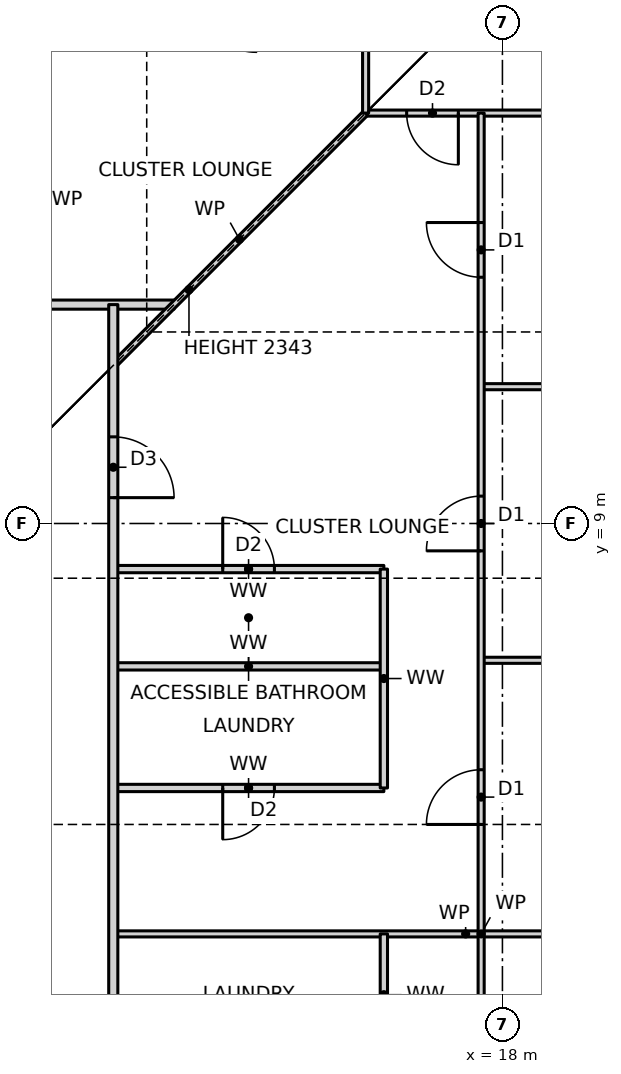
"""IFC4 building model, lengths in metres.
Left out: names, types, materials, properties, quantities, classifications, styles, units other than length and angle.
Written with IfcOpenShell. Run it as: python <this file> out.ifc"""

import sys

from ifc_helpers import new_model, si_unit, direction, frame, frame_2d, origin, place, context, subcontext, project, spatial, rectangle, extrude, element, fill, save


model = new_model("IFC4")
c1 = context("Model", 3, precision=1e-05, world=origin(), true_north=direction((0.0, 1.0)))
c2 = subcontext(c1, "Body", "Model", "MODEL_VIEW")
j1 = project(units=[si_unit("LENGTHUNIT", "METRE"), si_unit("PLANEANGLEUNIT", "RADIAN")], contexts=[c1])
p1 = place(None, origin())
s1 = spatial("IfcSite", under=j1, at=p1, CompositionType="ELEMENT")
p2 = place(p1, origin())
s2 = spatial("IfcBuilding", under=s1, at=p2, CompositionType="ELEMENT")
p3 = place(p2, frame((0.0, 0.0, 43.0)))
s3 = spatial("IfcBuildingStorey", under=s2, at=p3, CompositionType="ELEMENT", Elevation=43.0)
p4 = place(p3, frame((11.6, 2.25, 0.0), z_axis=(0.0, 0.0, 1.0), x_axis=(1.0, 0.0, 0.0)))
e1 = element("IfcWall", 1, at=p4, inside=s3, PredefinedType="PARTITIONING", context=c2, shape_type="SweptSolid", body=[
    extrude(rectangle(XDim=11.59, YDim=0.1, at=frame_2d((5.795, 0.0))), origin(), (0.0, 0.0, 1.0), 3.27),
])
p5 = place(p3, frame((11.6, 4.65, 0.0), z_axis=(0.0, 0.0, 1.0), x_axis=(1.0, 0.0, 0.0)))
e2 = element("IfcWall", 2, at=p5, inside=s3, PredefinedType="PARTITIONING", context=c2, shape_type="SweptSolid", body=[
    extrude(rectangle(XDim=4.45, YDim=0.12, at=frame_2d((2.225, 0.0))), origin(), (0.0, 0.0, 1.0), 3.27),
])
p6 = place(p5, frame((1.8, 0.0, 0.0)))
e3 = element("IfcOpeningElement", 3, at=p6, cuts=e2, PredefinedType="OPENING", context=c2, shape_type="SweptSolid", body=[
    extrude(rectangle(XDim=0.85, YDim=2.1, at=frame_2d((0.425, 1.05))), frame((0.0, 0.07, 0.0), z_axis=(0.0, -1.0, 0.0), x_axis=(1.0, 0.0, 0.0)), (0.0, 0.0, 1.0), 0.14),
])
p7 = place(p3, frame((11.6, 6.65, 0.0), z_axis=(0.0, 0.0, 1.0), x_axis=(1.0, 0.0, 0.0)))
e4 = element("IfcWall", 4, at=p7, inside=s3, PredefinedType="PARTITIONING", context=c2, shape_type="SweptSolid", body=[
    extrude(rectangle(XDim=4.45, YDim=0.12, at=frame_2d((2.225, 0.0))), origin(), (0.0, 0.0, 1.0), 3.27),
])
p8 = place(p3, frame((17.65, 6.75, 0.0), z_axis=(0.0, 0.0, 1.0), x_axis=(1.0, 0.0, 0.0)))
e5 = element("IfcWall", 5, at=p8, inside=s3, PredefinedType="PARTITIONING", context=c2, shape_type="SweptSolid", body=[
    extrude(rectangle(XDim=5.54, YDim=0.1, at=frame_2d((2.77, 0.0))), origin(), (0.0, 0.0, 1.0), 3.27),
])
p9 = place(p3, frame((11.6, 8.25, 0.0), z_axis=(0.0, 0.0, 1.0), x_axis=(1.0, 0.0, 0.0)))
e6 = element("IfcWall", 6, at=p9, inside=s3, PredefinedType="PARTITIONING", context=c2, shape_type="SweptSolid", body=[
    extrude(rectangle(XDim=4.45, YDim=0.12, at=frame_2d((2.225, 0.0))), origin(), (0.0, 0.0, 1.0), 3.27),
])
p10 = place(p9, frame((1.8, 0.0, 0.0)))
e7 = element("IfcOpeningElement", 7, at=p10, cuts=e6, PredefinedType="OPENING", context=c2, shape_type="SweptSolid", body=[
    extrude(rectangle(XDim=0.85, YDim=2.1, at=frame_2d((0.425, 1.05))), frame((0.0, 0.07, 0.0), z_axis=(0.0, -1.0, 0.0), x_axis=(1.0, 0.0, 0.0)), (0.0, 0.0, 1.0), 0.14),
])
p11 = place(p3, frame((17.65, 11.25, 0.0), z_axis=(0.0, 0.0, 1.0), x_axis=(1.0, 0.0, 0.0)))
e8 = element("IfcWall", 8, at=p11, inside=s3, PredefinedType="PARTITIONING", context=c2, shape_type="SweptSolid", body=[
    extrude(rectangle(XDim=5.54, YDim=0.1, at=frame_2d((2.77, 0.0))), origin(), (0.0, 0.0, 1.0), 3.27),
])
p12 = place(p3, frame((-12.6, 12.6, 0.0), z_axis=(0.0, 0.0, 1.0), x_axis=(1.0, 0.0, 0.0)))
e9 = element("IfcWall", 9, at=p12, inside=s3, PredefinedType="PARTITIONING", context=c2, shape_type="SweptSolid", body=[
    extrude(rectangle(XDim=25.2, YDim=0.15, at=frame_2d((12.6, 0.0))), origin(), (0.0, 0.0, 1.0), 3.27),
])
p13 = place(p12, frame((3.15, 0.0, 0.0)))
e10 = element("IfcOpeningElement", 10, at=p13, cuts=e9, PredefinedType="OPENING", context=c2, shape_type="SweptSolid", body=[
    extrude(rectangle(XDim=1.0, YDim=2.1, at=frame_2d((0.5, 1.05))), frame((0.0, 0.085, 0.0), z_axis=(0.0, -1.0, 0.0), x_axis=(1.0, 0.0, 0.0)), (0.0, 0.0, 1.0), 0.17),
])
p14 = place(p3, frame((15.75, 15.75, 0.0), z_axis=(0.0, 0.0, 1.0), x_axis=(1.0, 0.0, 0.0)))
e11 = element("IfcWall", 11, at=p14, inside=s3, PredefinedType="PARTITIONING", context=c2, shape_type="SweptSolid", body=[
    extrude(rectangle(XDim=7.44, YDim=0.1, at=frame_2d((3.72, 0.0))), origin(), (0.0, 0.0, 1.0), 3.27),
])
p15 = place(p14, frame((0.675, 0.0, 0.0)))
e12 = element("IfcOpeningElement", 12, at=p15, cuts=e11, PredefinedType="OPENING", context=c2, shape_type="SweptSolid", body=[
    extrude(rectangle(XDim=0.85, YDim=2.1, at=frame_2d((0.425, 1.05))), frame((0.0, 0.06, 0.0), z_axis=(0.0, -1.0, 0.0), x_axis=(1.0, 0.0, 0.0)), (0.0, 0.0, 1.0), 0.12),
])
p16 = place(p3, frame((11.6, 11.6, 0.0), z_axis=(0.0, 0.0, 1.0), x_axis=(0.707106781187, 0.707106781187, 0.0)))
e13 = element("IfcWall", 13, at=p16, inside=s3, PredefinedType="PARTITIONING", context=c2, shape_type="SweptSolid", body=[
    extrude(rectangle(XDim=5.869, YDim=0.1, at=frame_2d((2.935, 0.0))), origin(), (0.0, 0.0, 1.0), 2.343),
])
p17 = place(p3, frame((17.65, -11.25, 0.0), z_axis=(0.0, 0.0, 1.0), x_axis=(0.0, 1.0, 0.0)))
e14 = element("IfcWall", 14, at=p17, inside=s3, PredefinedType="PARTITIONING", context=c2, shape_type="SweptSolid", body=[
    extrude(rectangle(XDim=27.0, YDim=0.1, at=frame_2d((13.5, 0.0))), origin(), (0.0, 0.0, 1.0), 3.0),
])
p18 = place(p17, frame((1.8, 0.0, 0.0)))
e15 = element("IfcOpeningElement", 15, at=p18, cuts=e14, PredefinedType="OPENING", context=c2, shape_type="SweptSolid", body=[
    extrude(rectangle(XDim=0.9, YDim=2.1, at=frame_2d((0.45, 1.05))), frame((0.0, 0.06, 0.0), z_axis=(0.0, -1.0, 0.0), x_axis=(1.0, 0.0, 0.0)), (0.0, 0.0, 1.0), 0.12),
])
p19 = place(p17, frame((6.3, 0.0, 0.0)))
e16 = element("IfcOpeningElement", 16, at=p19, cuts=e14, PredefinedType="OPENING", context=c2, shape_type="SweptSolid", body=[
    extrude(rectangle(XDim=0.9, YDim=2.1, at=frame_2d((0.45, 1.05))), frame((0.0, 0.06, 0.0), z_axis=(0.0, -1.0, 0.0), x_axis=(1.0, 0.0, 0.0)), (0.0, 0.0, 1.0), 0.12),
])
p20 = place(p17, frame((10.8, 0.0, 0.0)))
e17 = element("IfcOpeningElement", 17, at=p20, cuts=e14, PredefinedType="OPENING", context=c2, shape_type="SweptSolid", body=[
    extrude(rectangle(XDim=0.9, YDim=2.1, at=frame_2d((0.45, 1.05))), frame((0.0, 0.06, 0.0), z_axis=(0.0, -1.0, 0.0), x_axis=(1.0, 0.0, 0.0)), (0.0, 0.0, 1.0), 0.12),
])
p21 = place(p17, frame((15.3, 0.0, 0.0)))
e18 = element("IfcOpeningElement", 18, at=p21, cuts=e14, PredefinedType="OPENING", context=c2, shape_type="SweptSolid", body=[
    extrude(rectangle(XDim=0.9, YDim=2.1, at=frame_2d((0.45, 1.05))), frame((0.0, 0.06, 0.0), z_axis=(0.0, -1.0, 0.0), x_axis=(1.0, 0.0, 0.0)), (0.0, 0.0, 1.0), 0.12),
])
p22 = place(p17, frame((19.8, 0.0, 0.0)))
e19 = element("IfcOpeningElement", 19, at=p22, cuts=e14, PredefinedType="OPENING", context=c2, shape_type="SweptSolid", body=[
    extrude(rectangle(XDim=0.9, YDim=2.1, at=frame_2d((0.45, 1.05))), frame((0.0, 0.06, 0.0), z_axis=(0.0, -1.0, 0.0), x_axis=(1.0, 0.0, 0.0)), (0.0, 0.0, 1.0), 0.12),
])
p23 = place(p17, frame((24.3, 0.0, 0.0)))
e20 = element("IfcOpeningElement", 20, at=p23, cuts=e14, PredefinedType="OPENING", context=c2, shape_type="SweptSolid", body=[
    extrude(rectangle(XDim=0.9, YDim=2.1, at=frame_2d((0.45, 1.05))), frame((0.0, 0.06, 0.0), z_axis=(0.0, -1.0, 0.0), x_axis=(1.0, 0.0, 0.0)), (0.0, 0.0, 1.0), 0.12),
])
p24 = place(p3, frame((16.05, 0.25, 0.0), z_axis=(0.0, 0.0, 1.0), x_axis=(0.0, 1.0, 0.0)))
e21 = element("IfcWall", 21, at=p24, inside=s3, PredefinedType="PARTITIONING", context=c2, shape_type="SweptSolid", body=[
    extrude(rectangle(XDim=2.0, YDim=0.12, at=frame_2d((1.0, 0.0))), origin(), (0.0, 0.0, 1.0), 3.27),
])
p25 = place(p3, frame((16.05, 4.65, 0.0), z_axis=(0.0, 0.0, 1.0), x_axis=(0.0, 1.0, 0.0)))
e22 = element("IfcWall", 22, at=p25, inside=s3, PredefinedType="PARTITIONING", context=c2, shape_type="SweptSolid", body=[
    extrude(rectangle(XDim=3.6, YDim=0.12, at=frame_2d((1.8, 0.0))), origin(), (0.0, 0.0, 1.0), 3.27),
])
p26 = place(p3, frame((15.75, 15.75, 0.0), z_axis=(0.0, 0.0, 1.0), x_axis=(0.0, 1.0, 0.0)))
e23 = element("IfcWall", 23, at=p26, inside=s3, PredefinedType="PARTITIONING", context=c2, shape_type="SweptSolid", body=[
    extrude(rectangle(XDim=7.44, YDim=0.1, at=frame_2d((3.72, 0.0))), origin(), (0.0, 0.0, 1.0), 3.27),
])
p27 = place(p3, frame((11.6, -11.6, 0.0), z_axis=(0.0, 0.0, 1.0), x_axis=(0.0, 1.0, 0.0)))
e24 = element("IfcWall", 24, at=p27, inside=s3, PredefinedType="PARTITIONING", context=c2, shape_type="SweptSolid", body=[
    extrude(rectangle(XDim=24.2, YDim=0.15, at=frame_2d((12.1, 0.0))), origin(), (0.0, 0.0, 1.0), 3.27),
])
p28 = place(p27, frame((3.6, 0.0, 0.0)))
e25 = element("IfcOpeningElement", 25, at=p28, cuts=e24, PredefinedType="OPENING", context=c2, shape_type="SweptSolid", body=[
    extrude(rectangle(XDim=1.0, YDim=2.1, at=frame_2d((0.5, 1.05))), frame((0.0, 0.085, 0.0), z_axis=(0.0, -1.0, 0.0), x_axis=(1.0, 0.0, 0.0)), (0.0, 0.0, 1.0), 0.17),
])
p29 = place(p27, frame((21.025, 0.0, 0.0)))
e26 = element("IfcOpeningElement", 26, at=p29, cuts=e24, PredefinedType="OPENING", context=c2, shape_type="SweptSolid", body=[
    extrude(rectangle(XDim=1.0, YDim=2.1, at=frame_2d((0.5, 1.05))), frame((0.0, 0.085, 0.0), z_axis=(0.0, -1.0, 0.0), x_axis=(1.0, 0.0, 0.0)), (0.0, 0.0, 1.0), 0.17),
])
p30 = place(p21, origin())
e27 = element("IfcDoor", 27, at=p30, inside=s3, OperationType="SINGLE_SWING_LEFT", PredefinedType="DOOR", context=c2, shape_type="SweptSolid", body=[
    extrude(rectangle(XDim=0.9, YDim=2.1, at=frame_2d((0.45, 1.05))), frame((0.0, 0.025, 0.0), z_axis=(0.0, -1.0, 0.0), x_axis=(1.0, 0.0, 0.0)), (0.0, 0.0, 1.0), 0.05),
])
fill(e18, e27)
p31 = place(p22, origin())
e28 = element("IfcDoor", 28, at=p31, inside=s3, OperationType="SINGLE_SWING_LEFT", PredefinedType="DOOR", context=c2, shape_type="SweptSolid", body=[
    extrude(rectangle(XDim=0.9, YDim=2.1, at=frame_2d((0.45, 1.05))), frame((0.0, 0.025, 0.0), z_axis=(0.0, -1.0, 0.0), x_axis=(1.0, 0.0, 0.0)), (0.0, 0.0, 1.0), 0.05),
])
fill(e19, e28)
p32 = place(p23, origin())
e29 = element("IfcDoor", 29, at=p32, inside=s3, OperationType="SINGLE_SWING_RIGHT", PredefinedType="DOOR", context=c2, shape_type="SweptSolid", body=[
    extrude(rectangle(XDim=0.9, YDim=2.1, at=frame_2d((0.45, 1.05))), frame((0.0, 0.025, 0.0), z_axis=(0.0, -1.0, 0.0), x_axis=(1.0, 0.0, 0.0)), (0.0, 0.0, 1.0), 0.05),
])
fill(e20, e29)
p33 = place(p29, frame((1.0, 0.0, 0.0), z_axis=(0.0, 0.0, 1.0), x_axis=(-1.0, 0.0, 0.0)))
e30 = element("IfcDoor", 30, at=p33, inside=s3, OperationType="SINGLE_SWING_RIGHT", PredefinedType="DOOR", context=c2, shape_type="SweptSolid", body=[
    extrude(rectangle(XDim=1.0, YDim=2.1, at=frame_2d((0.5, 1.05))), frame((0.0, 0.025, 0.0), z_axis=(0.0, -1.0, 0.0), x_axis=(1.0, 0.0, 0.0)), (0.0, 0.0, 1.0), 0.05),
])
fill(e26, e30)
p34 = place(p6, frame((0.85, 0.0, 0.0), z_axis=(0.0, 0.0, 1.0), x_axis=(-1.0, 0.0, 0.0)))
e31 = element("IfcDoor", 31, at=p34, inside=s3, OperationType="SINGLE_SWING_RIGHT", PredefinedType="DOOR", context=c2, shape_type="SweptSolid", body=[
    extrude(rectangle(XDim=0.85, YDim=2.1, at=frame_2d((0.425, 1.05))), frame((0.0, 0.025, 0.0), z_axis=(0.0, -1.0, 0.0), x_axis=(1.0, 0.0, 0.0)), (0.0, 0.0, 1.0), 0.05),
])
fill(e3, e31)
p35 = place(p10, origin())
e32 = element("IfcDoor", 32, at=p35, inside=s3, OperationType="SINGLE_SWING_LEFT", PredefinedType="DOOR", context=c2, shape_type="SweptSolid", body=[
    extrude(rectangle(XDim=0.85, YDim=2.1, at=frame_2d((0.425, 1.05))), frame((0.0, 0.025, 0.0), z_axis=(0.0, -1.0, 0.0), x_axis=(1.0, 0.0, 0.0)), (0.0, 0.0, 1.0), 0.05),
])
fill(e7, e32)
p36 = place(p15, frame((0.85, 0.0, 0.0), z_axis=(0.0, 0.0, 1.0), x_axis=(-1.0, 0.0, 0.0)))
e33 = element("IfcDoor", 33, at=p36, inside=s3, OperationType="SINGLE_SWING_LEFT", PredefinedType="DOOR", context=c2, shape_type="SweptSolid", body=[
    extrude(rectangle(XDim=0.85, YDim=2.1, at=frame_2d((0.425, 1.05))), frame((0.0, 0.025, 0.0), z_axis=(0.0, -1.0, 0.0), x_axis=(1.0, 0.0, 0.0)), (0.0, 0.0, 1.0), 0.05),
])
fill(e12, e33)
save(model, sys.argv[1])
